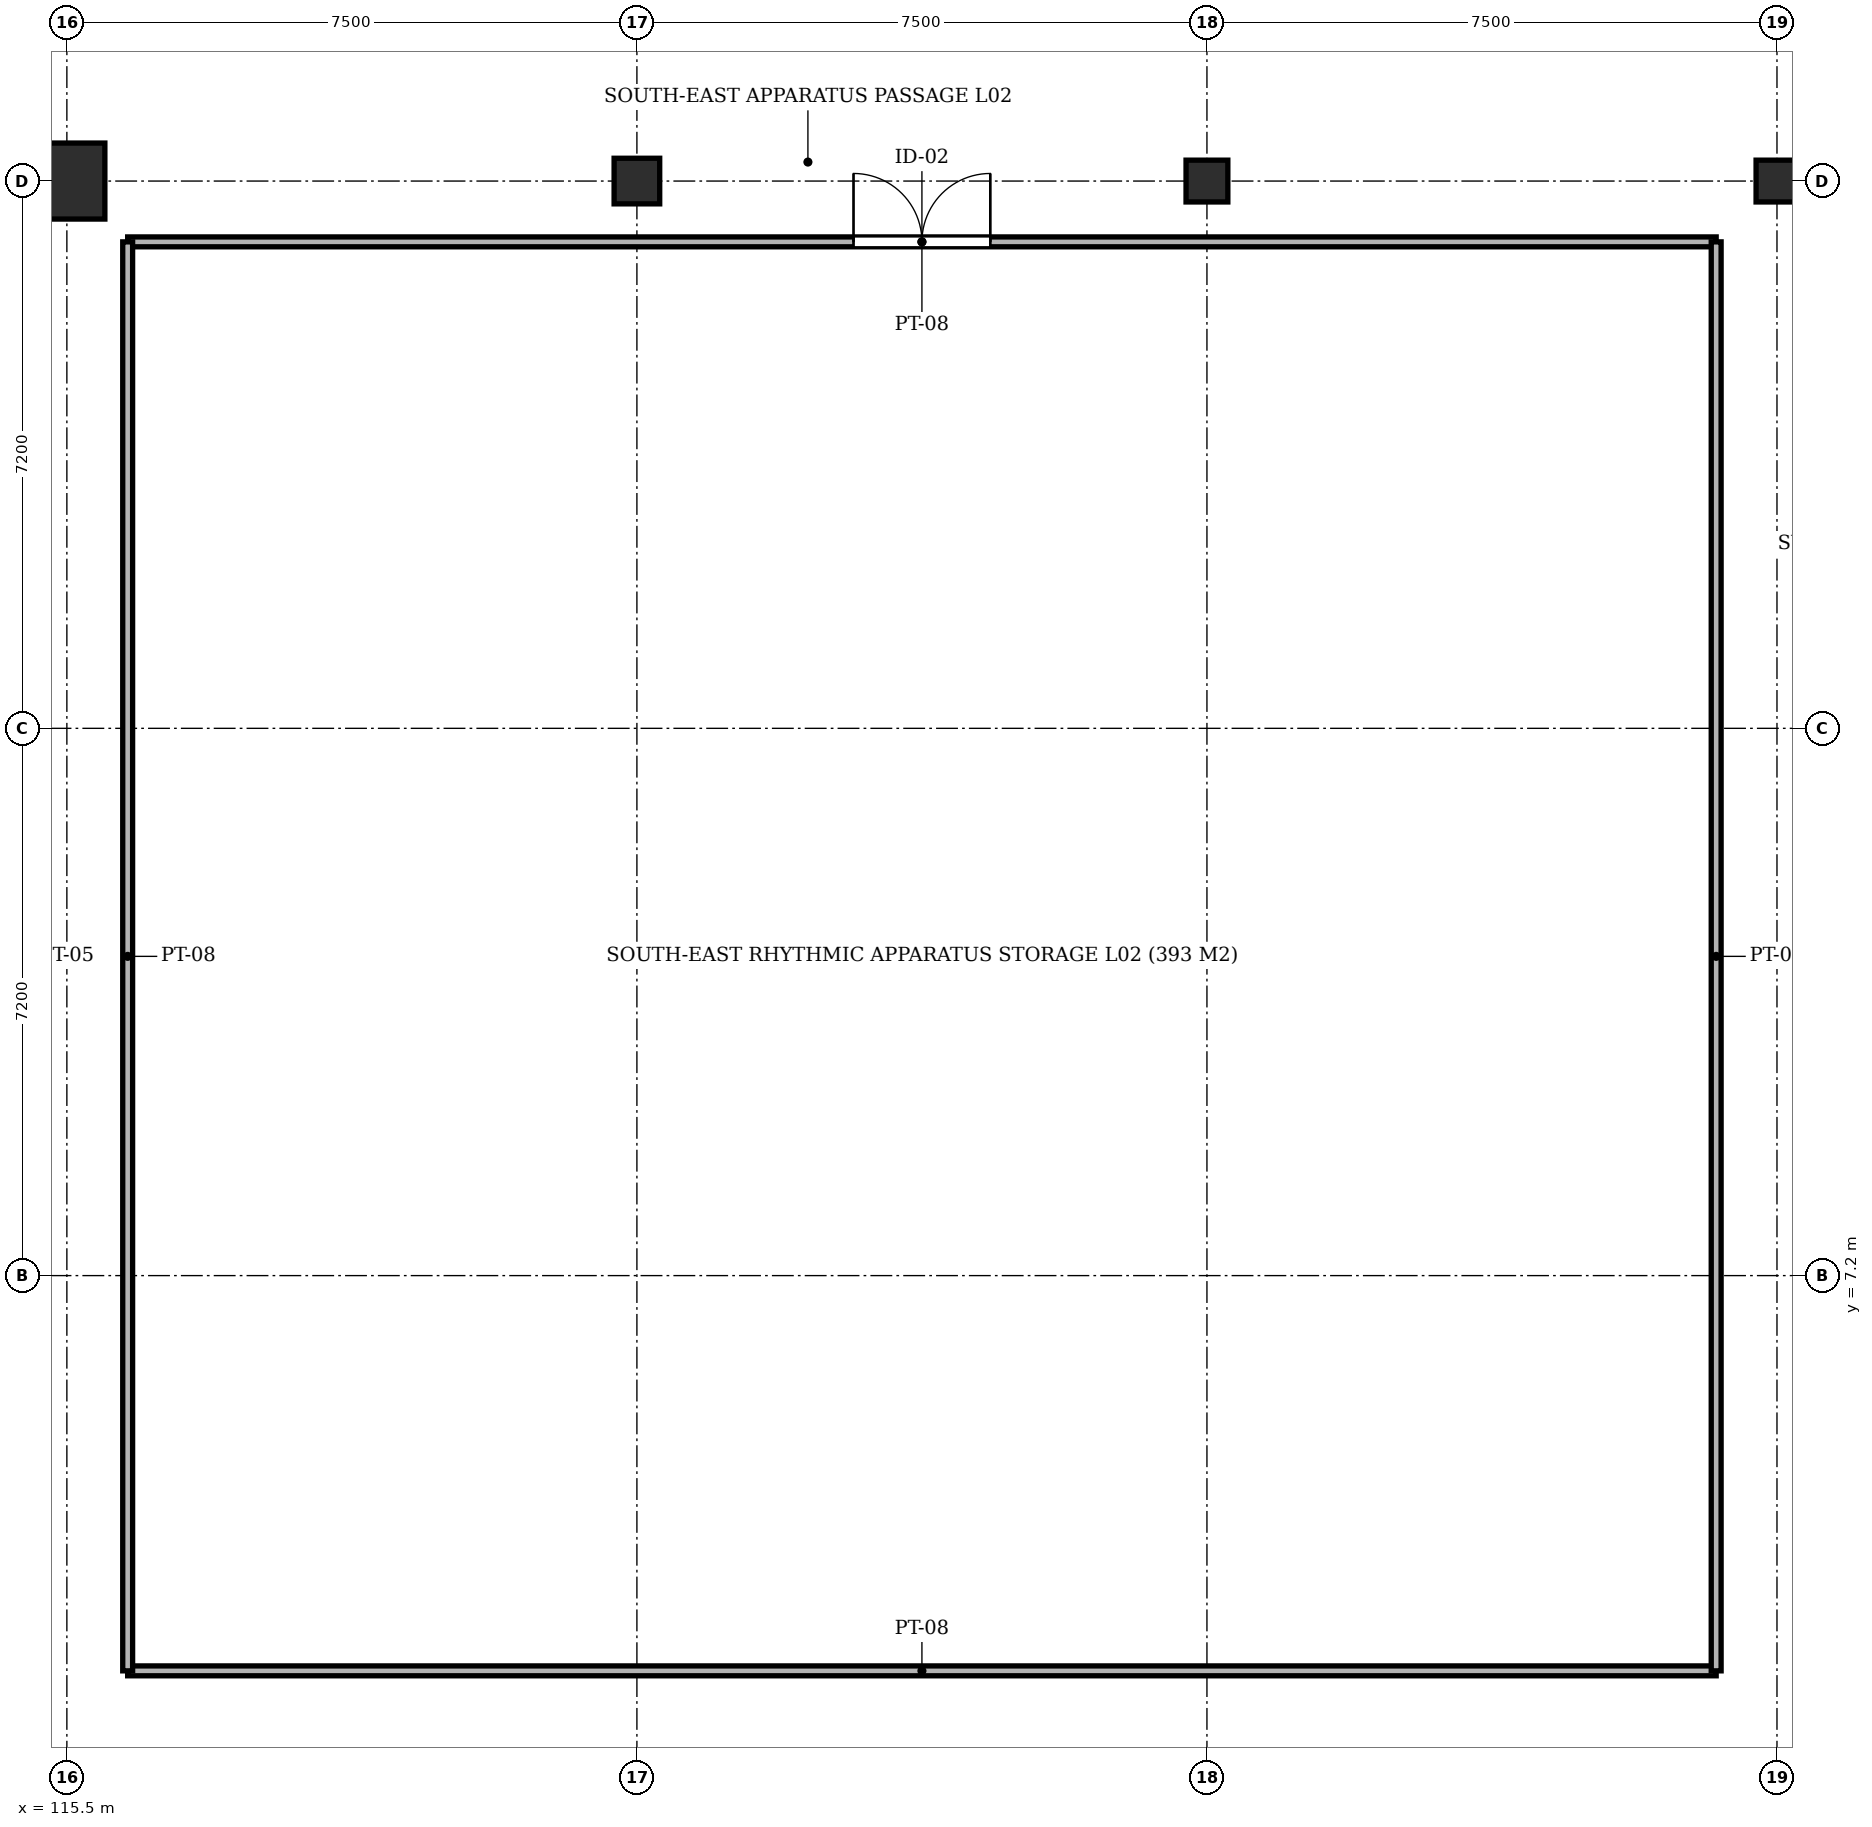
"""IFC4 building model, lengths in metres.
Left out: names, types, materials, properties, quantities, classifications, styles, units other than length and angle.
Written with IfcOpenShell. Run it as: python <this file> out.ifc"""

import sys

from ifc_helpers import new_model, si_unit, direction, frame, frame_2d, origin, origin_2d, place, context, subcontext, project, spatial, rectangle, extrude, element, fill, save


model = new_model("IFC4")
c1 = context("Model", 3, precision=1e-05, world=origin(), true_north=direction((0.0, 1.0)))
c2 = subcontext(c1, "Body", "Model", "MODEL_VIEW")
j1 = project(units=[si_unit("LENGTHUNIT", "METRE"), si_unit("PLANEANGLEUNIT", "RADIAN")], contexts=[c1])
p1 = place(None, origin())
s1 = spatial("IfcSite", under=j1, at=p1, CompositionType="ELEMENT")
p2 = place(p1, origin())
s2 = spatial("IfcBuilding", under=s1, at=p2, CompositionType="ELEMENT")
p3 = place(p2, frame((0.0, 0.0, 9.4)))
s3 = spatial("IfcBuildingStorey", under=s2, at=p3, CompositionType="ELEMENT", Elevation=9.4)
p4 = place(p3, frame((115.5, 21.6, -0.45), z_axis=(0.0, 0.0, 1.0), x_axis=(1.0, 0.0, 0.0)))
e1 = element("IfcColumn", 1, at=p4, inside=s3, PredefinedType="COLUMN", context=c2, shape_type="SweptSolid", body=[
    extrude(rectangle(XDim=1.0, YDim=1.0, at=origin_2d()), origin(), (0.0, 0.0, 1.0), 4.77),
])
p5 = place(p3, frame((123.0, 21.6, -0.45), z_axis=(0.0, 0.0, 1.0), x_axis=(1.0, 0.0, 0.0)))
e2 = element("IfcColumn", 2, at=p5, inside=s3, PredefinedType="COLUMN", context=c2, shape_type="SweptSolid", body=[
    extrude(rectangle(XDim=0.6, YDim=0.6, at=origin_2d()), origin(), (0.0, 0.0, 1.0), 4.77),
])
for number, where, z_axis, x_axis in (
    (3, (130.5, 21.6, -0.45), (0.0, 0.0, 1.0), (1.0, 0.0, 0.0)),
    (4, (138.0, 21.6, -0.45), (0.0, 0.0, 1.0), (1.0, 0.0, 0.0)),
):
    element("IfcColumn", number, at=place(p3, frame(where, z_axis=z_axis, x_axis=x_axis)), inside=s3, PredefinedType="COLUMN", context=c2, shape_type="SweptSolid", body=[
        extrude(rectangle(XDim=0.55, YDim=0.55, at=origin_2d()), origin(), (0.0, 0.0, 1.0), 4.77),
    ])
p6 = place(p3, frame((116.3, 2.0, 0.0), z_axis=(0.0, 0.0, 1.0), x_axis=(1.0, 0.0, 0.0)))
e5 = element("IfcWall", 5, at=p6, inside=s3, PredefinedType="PARTITIONING", context=c2, shape_type="SweptSolid", body=[
    extrude(rectangle(XDim=20.9, YDim=0.13, at=frame_2d((10.45, 0.0))), origin(), (0.0, 0.0, 1.0), 3.88),
])
p7 = place(p3, frame((116.3, 20.8, 0.0), z_axis=(0.0, 0.0, 1.0), x_axis=(1.0, 0.0, 0.0)))
e6 = element("IfcWall", 6, at=p7, inside=s3, PredefinedType="PARTITIONING", context=c2, shape_type="SweptSolid", body=[
    extrude(rectangle(XDim=20.9, YDim=0.13, at=frame_2d((10.45, 0.0))), origin(), (0.0, 0.0, 1.0), 3.88),
])
p8 = place(p7, frame((9.55, 0.0, 0.0)))
e7 = element("IfcOpeningElement", 7, at=p8, cuts=e6, PredefinedType="OPENING", context=c2, shape_type="SweptSolid", body=[
    extrude(rectangle(XDim=1.8, YDim=2.25, at=frame_2d((0.9, 1.125))), frame((0.0, 0.077, 0.0), z_axis=(0.0, -1.0, 0.0), x_axis=(1.0, 0.0, 0.0)), (0.0, 0.0, 1.0), 0.154),
])
for number, where, z_axis, x_axis in (
    (8, (116.3, 2.0, 0.0), (0.0, 0.0, 1.0), (0.0, 1.0, 0.0)),
    (9, (137.2, 2.0, 0.0), (0.0, 0.0, 1.0), (0.0, 1.0, 0.0)),
):
    element("IfcWall", number, at=place(p3, frame(where, z_axis=z_axis, x_axis=x_axis)), inside=s3, PredefinedType="PARTITIONING", context=c2, shape_type="SweptSolid", body=[
        extrude(rectangle(XDim=18.8, YDim=0.13, at=frame_2d((9.4, 0.0))), origin(), (0.0, 0.0, 1.0), 3.88),
    ])
p9 = place(p8, origin())
e10 = element("IfcDoor", 10, at=p9, inside=s3, OperationType="DOUBLE_DOOR_SINGLE_SWING", PredefinedType="DOOR", context=c2, shape_type="SweptSolid", body=[
    extrude(rectangle(XDim=1.8, YDim=2.25, at=frame_2d((0.9, 1.125))), frame((0.0, 0.025, 0.0), z_axis=(0.0, -1.0, 0.0), x_axis=(1.0, 0.0, 0.0)), (0.0, 0.0, 1.0), 0.05),
])
fill(e7, e10)
save(model, sys.argv[1])
